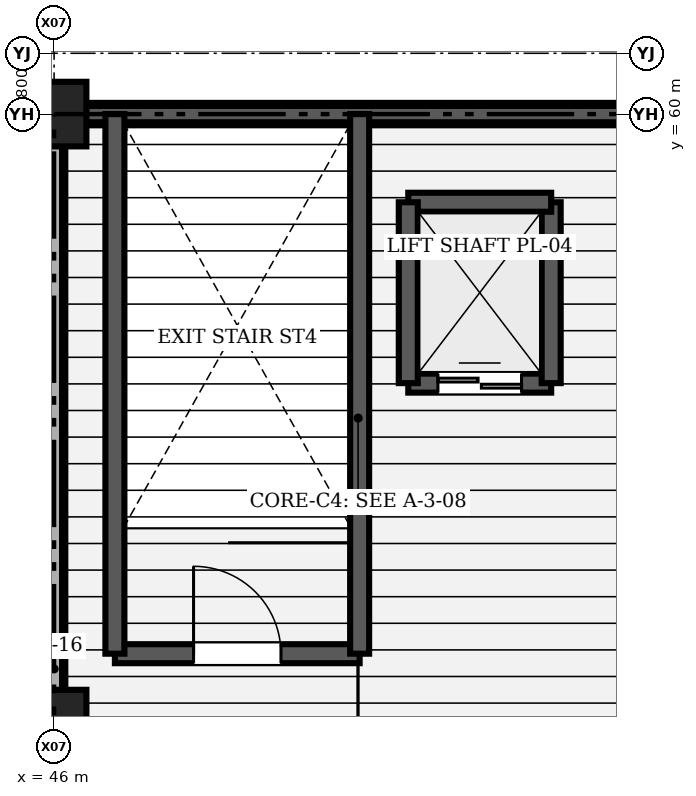
"""IFC4 building model, lengths in metres.
Left out: names, types, materials, properties, quantities, classifications, styles, units other than length and angle.
Written with IfcOpenShell. Run it as: python <this file> out.ifc"""

import sys

from ifc_helpers import new_model, si_unit, direction, frame, frame_2d, origin, origin_2d, place, context, subcontext, project, spatial, polyline, rectangle, outline, extrude, element, fill, save


model = new_model("IFC4")
c1 = context("Model", 3, precision=1e-05, world=origin(), true_north=direction((0.0, 1.0)))
c2 = subcontext(c1, "Body", "Model", "MODEL_VIEW")
j1 = project(units=[si_unit("LENGTHUNIT", "METRE"), si_unit("PLANEANGLEUNIT", "RADIAN")], contexts=[c1])
p1 = place(None, origin())
s1 = spatial("IfcSite", under=j1, at=p1, CompositionType="ELEMENT")
p2 = place(p1, origin())
s2 = spatial("IfcBuilding", under=s1, at=p2, CompositionType="ELEMENT")
p3 = place(p2, frame((0.0, 0.0, 13.5)))
s3 = spatial("IfcBuildingStorey", under=s2, at=p3, CompositionType="ELEMENT", Elevation=13.5)
for number, where, z_axis, x_axis in (
    (1, (46.0, 52.0, 0.0), (0.0, 0.0, 1.0), (1.0, 0.0, 0.0)),
    (2, (46.0, 60.0, 0.0), (0.0, 0.0, 1.0), (1.0, 0.0, 0.0)),
):
    element("IfcColumn", number, at=place(p3, frame(where, z_axis=z_axis, x_axis=x_axis)), inside=s3, PredefinedType="COLUMN", context=c2, shape_type="SweptSolid", body=[
        extrude(rectangle(XDim=0.85, YDim=0.85, at=origin_2d()), origin(), (0.0, 0.0, 1.0), 4.5),
    ])
p4 = place(p3, frame((53.75, 60.0, 0.0), z_axis=(0.0, 0.0, 1.0), x_axis=(-1.0, 0.0, 0.0)))
e3 = element("IfcWall", 3, at=p4, inside=s3, PredefinedType="SOLIDWALL", context=c2, shape_type="SweptSolid", body=[
    extrude(rectangle(XDim=7.325, YDim=0.295, at=frame_2d((3.663, 0.0))), origin(), (0.0, 0.0, 1.0), 4.19),
])
p5 = place(p3, frame((46.0, 59.575, 0.0), z_axis=(0.0, 0.0, 1.0), x_axis=(0.0, -1.0, 0.0)))
e4 = element("IfcWall", 4, at=p5, inside=s3, PredefinedType="SOLIDWALL", context=c2, shape_type="SweptSolid", body=[
    extrude(rectangle(XDim=7.15, YDim=0.295, at=frame_2d((3.575, 0.0))), origin(), (0.0, 0.0, 1.0), 3.04),
])
p6 = place(p3, frame((46.0, 60.0, 4.5), z_axis=(0.0, 0.0, 1.0), x_axis=(1.0, 0.0, 0.0)))
e5 = element("IfcWall", 5, at=p6, inside=s3, PredefinedType="SOLIDWALL", context=c2, shape_type="SweptSolid", body=[
    extrude(outline(polyline([(0.0, 0.0), (8.0, 0.0), (8.0, 0.05), (4.0, 7.75), (0.0, 0.05), (0.0, 0.0)])), frame((0.0, 0.107, 0.0), z_axis=(0.0, -1.0, 0.0), x_axis=(1.0, 0.0, 0.0)), (0.0, 0.0, 1.0), 0.215),
])
p7 = place(p3, frame((46.0, 23.2, 4.5), z_axis=(0.0, 0.0, 1.0), x_axis=(0.0, 1.0, 0.0)))
e6 = element("IfcWall", 6, at=p7, inside=s3, PredefinedType="PARAPET", context=c2, shape_type="SweptSolid", body=[
    extrude(rectangle(XDim=36.8, YDim=0.21, at=frame_2d((18.4, 0.0))), origin(), (0.0, 0.0, 1.0), 0.85),
])
p8 = place(p3, frame((46.8, 52.9, 0.0), z_axis=(0.0, 0.0, 1.0), x_axis=(1.0, 0.0, 0.0)))
e7 = element("IfcWall", 7, at=p8, inside=s3, PredefinedType="SHEAR", context=c2, shape_type="SweptSolid", body=[
    extrude(rectangle(XDim=3.22, YDim=0.25, at=frame_2d((1.61, 0.0))), origin(), (0.0, 0.0, 1.0), 4.5),
])
p9 = place(p8, frame((1.035, 0.0, 0.0)))
e8 = element("IfcOpeningElement", 8, at=p9, cuts=e7, PredefinedType="OPENING", context=c2, shape_type="SweptSolid", body=[
    extrude(rectangle(XDim=1.15, YDim=2.15, at=frame_2d((0.575, 1.075))), frame((0.0, 0.135, 0.0), z_axis=(0.0, -1.0, 0.0), x_axis=(1.0, 0.0, 0.0)), (0.0, 0.0, 1.0), 0.27),
])
for number, where, z_axis, x_axis in (
    (9, (50.02, 52.9, 0.0), (0.0, 0.0, 1.0), (0.0, 1.0, 0.0)),
    (10, (46.8, 60.0, 0.0), (0.0, 0.0, 1.0), (0.0, -1.0, 0.0)),
):
    element("IfcWall", number, at=place(p3, frame(where, z_axis=z_axis, x_axis=x_axis)), inside=s3, PredefinedType="SHEAR", context=c2, shape_type="SweptSolid", body=[
        extrude(rectangle(XDim=7.1, YDim=0.25, at=frame_2d((3.55, 0.0))), origin(), (0.0, 0.0, 1.0), 4.5),
    ])
p10 = place(p3, frame((50.66, 56.46, 0.0), z_axis=(0.0, 0.0, 1.0), x_axis=(1.0, 0.0, 0.0)))
e11 = element("IfcWall", 11, at=p10, inside=s3, PredefinedType="SHEAR", context=c2, shape_type="SweptSolid", body=[
    extrude(rectangle(XDim=1.88, YDim=0.25, at=frame_2d((0.94, 0.0))), origin(), (0.0, 0.0, 1.0), 6.12),
])
p11 = place(p10, frame((0.39, 0.0, 0.0)))
e12 = element("IfcOpeningElement", 12, at=p11, cuts=e11, PredefinedType="OPENING", context=c2, shape_type="SweptSolid", body=[
    extrude(rectangle(XDim=1.1, YDim=2.2, at=frame_2d((0.55, 1.1))), frame((0.0, 0.135, 0.0), z_axis=(0.0, -1.0, 0.0), x_axis=(1.0, 0.0, 0.0)), (0.0, 0.0, 1.0), 0.27),
])
p12 = place(p3, frame((52.54, 56.46, 0.0), z_axis=(0.0, 0.0, 1.0), x_axis=(0.0, 1.0, 0.0)))
e13 = element("IfcWall", 13, at=p12, inside=s3, PredefinedType="SHEAR", context=c2, shape_type="SweptSolid", body=[
    extrude(rectangle(XDim=2.38, YDim=0.25, at=frame_2d((1.19, 0.0))), origin(), (0.0, 0.0, 1.0), 6.12),
])
p13 = place(p3, frame((52.54, 58.84, 0.0), z_axis=(0.0, 0.0, 1.0), x_axis=(-1.0, 0.0, 0.0)))
e14 = element("IfcWall", 14, at=p13, inside=s3, PredefinedType="SHEAR", context=c2, shape_type="SweptSolid", body=[
    extrude(rectangle(XDim=1.88, YDim=0.25, at=frame_2d((0.94, 0.0))), origin(), (0.0, 0.0, 1.0), 6.12),
])
p14 = place(p3, frame((50.66, 58.84, 0.0), z_axis=(0.0, 0.0, 1.0), x_axis=(0.0, -1.0, 0.0)))
e15 = element("IfcWall", 15, at=p14, inside=s3, PredefinedType="SHEAR", context=c2, shape_type="SweptSolid", body=[
    extrude(rectangle(XDim=2.38, YDim=0.25, at=frame_2d((1.19, 0.0))), origin(), (0.0, 0.0, 1.0), 6.12),
])
p15 = place(p9, origin())
e16 = element("IfcDoor", 16, at=p15, inside=s3, OperationType="SINGLE_SWING_LEFT", PredefinedType="DOOR", context=c2, shape_type="SweptSolid", body=[
    extrude(rectangle(XDim=1.15, YDim=2.15, at=frame_2d((0.575, 1.075))), frame((0.0, 0.025, 0.0), z_axis=(0.0, -1.0, 0.0), x_axis=(1.0, 0.0, 0.0)), (0.0, 0.0, 1.0), 0.05),
])
fill(e8, e16)
p16 = place(p11, origin())
e17 = element("IfcDoor", 17, at=p16, inside=s3, OperationType="DOUBLE_DOOR_SLIDING", PredefinedType="DOOR", context=c2, shape_type="SweptSolid", body=[
    extrude(rectangle(XDim=1.1, YDim=2.2, at=frame_2d((0.55, 1.1))), frame((0.0, 0.025, 0.0), z_axis=(0.0, -1.0, 0.0), x_axis=(1.0, 0.0, 0.0)), (0.0, 0.0, 1.0), 0.05),
])
fill(e12, e17)
save(model, sys.argv[1])
